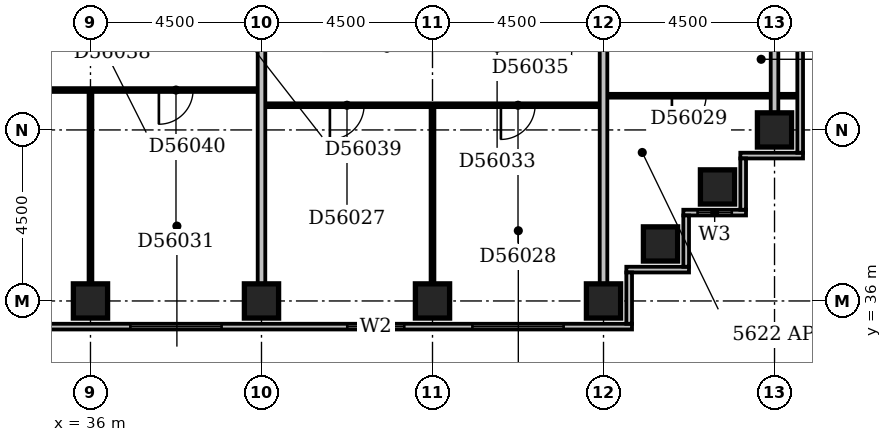
"""IFC4 building model, lengths in metres.
Left out: names, types, materials, properties, quantities, classifications, styles, units other than length and angle.
Written with IfcOpenShell. Run it as: python <this file> out.ifc"""

import sys

from ifc_helpers import new_model, si_unit, direction, frame, frame_2d, origin, origin_2d, place, context, subcontext, project, spatial, rectangle, extrude, element, fill, save


model = new_model("IFC4")
c1 = context("Model", 3, precision=1e-05, world=origin(), true_north=direction((0.0, 1.0)))
c2 = subcontext(c1, "Body", "Model", "MODEL_VIEW")
j1 = project(units=[si_unit("LENGTHUNIT", "METRE"), si_unit("PLANEANGLEUNIT", "RADIAN")], contexts=[c1])
p1 = place(None, origin())
s1 = spatial("IfcSite", under=j1, at=p1, CompositionType="ELEMENT")
p2 = place(p1, origin())
s2 = spatial("IfcBuilding", under=s1, at=p2, CompositionType="ELEMENT")
p3 = place(p2, frame((0.0, 0.0, 218.6)))
s3 = spatial("IfcBuildingStorey", under=s2, at=p3, CompositionType="ELEMENT", Elevation=218.6)
for number, where, z_axis, x_axis in (
    (1, (36.0, 36.0, -0.3), (0.0, 0.0, 1.0), (1.0, 0.0, 0.0)),
    (2, (40.5, 36.0, -0.3), (0.0, 0.0, 1.0), (1.0, 0.0, 0.0)),
    (3, (45.0, 36.0, -0.3), (0.0, 0.0, 1.0), (1.0, 0.0, 0.0)),
    (4, (49.5, 36.0, -0.3), (0.0, 0.0, 1.0), (1.0, 0.0, 0.0)),
    (5, (51.0, 37.5, -0.3), (0.0, 0.0, 1.0), (1.0, 0.0, 0.0)),
    (6, (52.5, 39.0, -0.3), (0.0, 0.0, 1.0), (1.0, 0.0, 0.0)),
    (7, (54.0, 40.5, -0.3), (0.0, 0.0, 1.0), (1.0, 0.0, 0.0)),
):
    element("IfcColumn", number, at=place(p3, frame(where, z_axis=z_axis, x_axis=x_axis)), inside=s3, PredefinedType="COLUMN", context=c2, shape_type="SweptSolid", body=[
        extrude(rectangle(XDim=0.9, YDim=0.9, at=origin_2d()), origin(), (0.0, 0.0, 1.0), 3.6),
    ])
p4 = place(p3, frame((23.1, 35.325, 0.0), z_axis=(0.0, 0.0, 1.0), x_axis=(1.0, 0.0, 0.0)))
e8 = element("IfcWall", 8, at=p4, inside=s3, PredefinedType="STANDARD", context=c2, shape_type="SweptSolid", body=[
    extrude(rectangle(XDim=27.15, YDim=0.15, at=frame_2d((13.575, 0.0))), origin(), (0.0, 0.0, 1.0), 2.7),
])
p5 = place(p4, frame((0.45, 0.0, 0.6)))
e9 = element("IfcOpeningElement", 9, at=p5, cuts=e8, PredefinedType="OPENING", context=c2, shape_type="SweptSolid", body=[
    extrude(rectangle(XDim=2.4, YDim=1.8, at=frame_2d((1.2, 0.9))), frame((0.0, 0.087, 0.0), z_axis=(0.0, -1.0, 0.0), x_axis=(1.0, 0.0, 0.0)), (0.0, 0.0, 1.0), 0.174),
])
p6 = place(p4, frame((4.571, 0.0, 0.6)))
e10 = element("IfcOpeningElement", 10, at=p6, cuts=e8, PredefinedType="OPENING", context=c2, shape_type="SweptSolid", body=[
    extrude(rectangle(XDim=2.1, YDim=1.8, at=frame_2d((1.05, 0.9))), frame((0.0, 0.087, 0.0), z_axis=(0.0, -1.0, 0.0), x_axis=(1.0, 0.0, 0.0)), (0.0, 0.0, 1.0), 0.174),
])
p7 = place(p4, frame((9.45, 0.0, 0.6)))
e11 = element("IfcOpeningElement", 11, at=p7, cuts=e8, PredefinedType="OPENING", context=c2, shape_type="SweptSolid", body=[
    extrude(rectangle(XDim=2.4, YDim=1.8, at=frame_2d((1.2, 0.9))), frame((0.0, 0.087, 0.0), z_axis=(0.0, -1.0, 0.0), x_axis=(1.0, 0.0, 0.0)), (0.0, 0.0, 1.0), 0.174),
])
p8 = place(p4, frame((13.95, 0.0, 0.6)))
e12 = element("IfcOpeningElement", 12, at=p8, cuts=e8, PredefinedType="OPENING", context=c2, shape_type="SweptSolid", body=[
    extrude(rectangle(XDim=2.4, YDim=1.8, at=frame_2d((1.2, 0.9))), frame((0.0, 0.087, 0.0), z_axis=(0.0, -1.0, 0.0), x_axis=(1.0, 0.0, 0.0)), (0.0, 0.0, 1.0), 0.174),
])
p9 = place(p4, frame((19.657, 0.0, 0.6)))
e13 = element("IfcOpeningElement", 13, at=p9, cuts=e8, PredefinedType="OPENING", context=c2, shape_type="SweptSolid", body=[
    extrude(rectangle(XDim=1.5, YDim=1.8, at=frame_2d((0.75, 0.9))), frame((0.0, 0.087, 0.0), z_axis=(0.0, -1.0, 0.0), x_axis=(1.0, 0.0, 0.0)), (0.0, 0.0, 1.0), 0.174),
])
p10 = place(p4, frame((22.95, 0.0, 0.6)))
e14 = element("IfcOpeningElement", 14, at=p10, cuts=e8, PredefinedType="OPENING", context=c2, shape_type="SweptSolid", body=[
    extrude(rectangle(XDim=2.4, YDim=1.8, at=frame_2d((1.2, 0.9))), frame((0.0, 0.087, 0.0), z_axis=(0.0, -1.0, 0.0), x_axis=(1.0, 0.0, 0.0)), (0.0, 0.0, 1.0), 0.174),
])
p11 = place(p3, frame((50.175, 35.4, 0.0), z_axis=(0.0, 0.0, 1.0), x_axis=(0.0, 1.0, 0.0)))
e15 = element("IfcWall", 15, at=p11, inside=s3, PredefinedType="STANDARD", context=c2, shape_type="SweptSolid", body=[
    extrude(rectangle(XDim=1.35, YDim=0.15, at=frame_2d((0.675, 0.0))), origin(), (0.0, 0.0, 1.0), 2.7),
])
p12 = place(p3, frame((50.1, 36.825, 0.0), z_axis=(0.0, 0.0, 1.0), x_axis=(1.0, 0.0, 0.0)))
e16 = element("IfcWall", 16, at=p12, inside=s3, PredefinedType="STANDARD", context=c2, shape_type="SweptSolid", body=[
    extrude(rectangle(XDim=1.65, YDim=0.15, at=frame_2d((0.825, 0.0))), origin(), (0.0, 0.0, 1.0), 2.7),
])
p13 = place(p3, frame((51.675, 36.9, 0.0), z_axis=(0.0, 0.0, 1.0), x_axis=(0.0, 1.0, 0.0)))
e17 = element("IfcWall", 17, at=p13, inside=s3, PredefinedType="STANDARD", context=c2, shape_type="SweptSolid", body=[
    extrude(rectangle(XDim=1.35, YDim=0.15, at=frame_2d((0.675, 0.0))), origin(), (0.0, 0.0, 1.0), 2.7),
])
p14 = place(p3, frame((51.6, 38.325, 0.0), z_axis=(0.0, 0.0, 1.0), x_axis=(1.0, 0.0, 0.0)))
e18 = element("IfcWall", 18, at=p14, inside=s3, PredefinedType="STANDARD", context=c2, shape_type="SweptSolid", body=[
    extrude(rectangle(XDim=1.65, YDim=0.15, at=frame_2d((0.825, 0.0))), origin(), (0.0, 0.0, 1.0), 2.7),
])
p15 = place(p14, frame((0.375, 0.0, 0.6)))
e19 = element("IfcOpeningElement", 19, at=p15, cuts=e18, PredefinedType="OPENING", context=c2, shape_type="SweptSolid", body=[
    extrude(rectangle(XDim=0.9, YDim=1.8, at=frame_2d((0.45, 0.9))), frame((0.0, 0.087, 0.0), z_axis=(0.0, -1.0, 0.0), x_axis=(1.0, 0.0, 0.0)), (0.0, 0.0, 1.0), 0.174),
])
p16 = place(p3, frame((53.175, 38.4, 0.0), z_axis=(0.0, 0.0, 1.0), x_axis=(0.0, 1.0, 0.0)))
e20 = element("IfcWall", 20, at=p16, inside=s3, PredefinedType="STANDARD", context=c2, shape_type="SweptSolid", body=[
    extrude(rectangle(XDim=1.35, YDim=0.15, at=frame_2d((0.675, 0.0))), origin(), (0.0, 0.0, 1.0), 2.7),
])
p17 = place(p3, frame((53.1, 39.825, 0.0), z_axis=(0.0, 0.0, 1.0), x_axis=(1.0, 0.0, 0.0)))
e21 = element("IfcWall", 21, at=p17, inside=s3, PredefinedType="STANDARD", context=c2, shape_type="SweptSolid", body=[
    extrude(rectangle(XDim=1.65, YDim=0.15, at=frame_2d((0.825, 0.0))), origin(), (0.0, 0.0, 1.0), 2.7),
])
p18 = place(p3, frame((54.675, 39.9, 0.0), z_axis=(0.0, 0.0, 1.0), x_axis=(0.0, 1.0, 0.0)))
e22 = element("IfcWall", 22, at=p18, inside=s3, PredefinedType="STANDARD", context=c2, shape_type="SweptSolid", body=[
    extrude(rectangle(XDim=14.85, YDim=0.15, at=frame_2d((7.425, 0.0))), origin(), (0.0, 0.0, 1.0), 2.7),
])
p19 = place(p3, frame((36.0, 36.45, 0.0), z_axis=(0.0, 0.0, 1.0), x_axis=(0.0, 1.0, 0.0)))
e23 = element("IfcWall", 23, at=p19, inside=s3, PredefinedType="PARTITIONING", context=c2, shape_type="SweptSolid", body=[
    extrude(rectangle(XDim=5.05, YDim=0.1, at=frame_2d((2.525, 0.0))), origin(), (0.0, 0.0, 1.0), 2.4),
])
p20 = place(p3, frame((40.5, 36.45, 0.0), z_axis=(0.0, 0.0, 1.0), x_axis=(0.0, 1.0, 0.0)))
e24 = element("IfcWall", 24, at=p20, inside=s3, PredefinedType="PARTITIONING", context=c2, shape_type="SweptSolid", body=[
    extrude(rectangle(XDim=12.95, YDim=0.2, at=frame_2d((6.475, 0.0))), origin(), (0.0, 0.0, 1.0), 3.3),
])
p21 = place(p3, frame((45.0, 36.45, 0.0), z_axis=(0.0, 0.0, 1.0), x_axis=(0.0, 1.0, 0.0)))
e25 = element("IfcWall", 25, at=p21, inside=s3, PredefinedType="PARTITIONING", context=c2, shape_type="SweptSolid", body=[
    extrude(rectangle(XDim=4.65, YDim=0.1, at=frame_2d((2.325, 0.0))), origin(), (0.0, 0.0, 1.0), 2.6),
])
p22 = place(p3, frame((49.5, 36.45, 0.0), z_axis=(0.0, 0.0, 1.0), x_axis=(0.0, 1.0, 0.0)))
e26 = element("IfcWall", 26, at=p22, inside=s3, PredefinedType="PARTITIONING", context=c2, shape_type="SweptSolid", body=[
    extrude(rectangle(XDim=12.95, YDim=0.2, at=frame_2d((6.475, 0.0))), origin(), (0.0, 0.0, 1.0), 3.3),
])
p23 = place(p3, frame((54.0, 40.95, 0.0), z_axis=(0.0, 0.0, 1.0), x_axis=(0.0, 1.0, 0.0)))
e27 = element("IfcWall", 27, at=p23, inside=s3, PredefinedType="PARTITIONING", context=c2, shape_type="SweptSolid", body=[
    extrude(rectangle(XDim=8.1, YDim=0.2, at=frame_2d((4.05, 0.0))), origin(), (0.0, 0.0, 1.0), 2.7),
])
p24 = place(p3, frame((40.6, 41.15, 0.0), z_axis=(0.0, 0.0, 1.0), x_axis=(1.0, 0.0, 0.0)))
e28 = element("IfcWall", 28, at=p24, inside=s3, PredefinedType="PARTITIONING", context=c2, shape_type="SweptSolid", body=[
    extrude(rectangle(XDim=8.8, YDim=0.1, at=frame_2d((4.4, 0.0))), origin(), (0.0, 0.0, 1.0), 3.3),
])
p25 = place(p24, frame((1.7, 0.0, 0.0)))
e29 = element("IfcOpeningElement", 29, at=p25, cuts=e28, PredefinedType="OPENING", context=c2, shape_type="SweptSolid", body=[
    extrude(rectangle(XDim=0.9, YDim=2.1, at=frame_2d((0.45, 1.05))), frame((0.0, 0.062, 0.0), z_axis=(0.0, -1.0, 0.0), x_axis=(1.0, 0.0, 0.0)), (0.0, 0.0, 1.0), 0.124),
])
p26 = place(p24, frame((6.2, 0.0, 0.0)))
e30 = element("IfcOpeningElement", 30, at=p26, cuts=e28, PredefinedType="OPENING", context=c2, shape_type="SweptSolid", body=[
    extrude(rectangle(XDim=0.9, YDim=2.1, at=frame_2d((0.45, 1.05))), frame((0.0, 0.062, 0.0), z_axis=(0.0, -1.0, 0.0), x_axis=(1.0, 0.0, 0.0)), (0.0, 0.0, 1.0), 0.124),
])
p27 = place(p3, frame((49.6, 41.4, 0.0), z_axis=(0.0, 0.0, 1.0), x_axis=(1.0, 0.0, 0.0)))
e31 = element("IfcWall", 31, at=p27, inside=s3, PredefinedType="PARTITIONING", context=c2, shape_type="SweptSolid", body=[
    extrude(rectangle(XDim=5.0, YDim=0.1, at=frame_2d((2.5, 0.0))), origin(), (0.0, 0.0, 1.0), 3.3),
])
p28 = place(p27, frame((1.7, 0.0, 0.0)))
e32 = element("IfcOpeningElement", 32, at=p28, cuts=e31, PredefinedType="OPENING", context=c2, shape_type="SweptSolid", body=[
    extrude(rectangle(XDim=0.9, YDim=2.1, at=frame_2d((0.45, 1.05))), frame((0.0, 0.062, 0.0), z_axis=(0.0, -1.0, 0.0), x_axis=(1.0, 0.0, 0.0)), (0.0, 0.0, 1.0), 0.124),
])
p29 = place(p3, frame((27.1, 41.55, 0.0), z_axis=(0.0, 0.0, 1.0), x_axis=(1.0, 0.0, 0.0)))
e33 = element("IfcWall", 33, at=p29, inside=s3, PredefinedType="PARTITIONING", context=c2, shape_type="SweptSolid", body=[
    extrude(rectangle(XDim=13.3, YDim=0.1, at=frame_2d((6.65, 0.0))), origin(), (0.0, 0.0, 1.0), 3.3),
])
p30 = place(p29, frame((3.9, 0.0, 0.0)))
e34 = element("IfcOpeningElement", 34, at=p30, cuts=e33, PredefinedType="OPENING", context=c2, shape_type="SweptSolid", body=[
    extrude(rectangle(XDim=0.9, YDim=2.1, at=frame_2d((0.45, 1.05))), frame((0.0, 0.062, 0.0), z_axis=(0.0, -1.0, 0.0), x_axis=(1.0, 0.0, 0.0)), (0.0, 0.0, 1.0), 0.124),
])
p31 = place(p29, frame((10.7, 0.0, 0.0)))
e35 = element("IfcOpeningElement", 35, at=p31, cuts=e33, PredefinedType="OPENING", context=c2, shape_type="SweptSolid", body=[
    extrude(rectangle(XDim=0.9, YDim=2.1, at=frame_2d((0.45, 1.05))), frame((0.0, 0.062, 0.0), z_axis=(0.0, -1.0, 0.0), x_axis=(1.0, 0.0, 0.0)), (0.0, 0.0, 1.0), 0.124),
])
p32 = place(p8, origin())
e36 = element("IfcWindow", 36, at=p32, inside=s3, PartitioningType="SINGLE_PANEL", PredefinedType="WINDOW", context=c2, shape_type="SweptSolid", body=[
    extrude(rectangle(XDim=2.4, YDim=1.8, at=frame_2d((1.2, 0.9))), frame((0.0, 0.03, 0.0), z_axis=(0.0, -1.0, 0.0), x_axis=(1.0, 0.0, 0.0)), (0.0, 0.0, 1.0), 0.06),
])
fill(e12, e36)
p33 = place(p9, origin())
e37 = element("IfcWindow", 37, at=p33, inside=s3, PartitioningType="SINGLE_PANEL", PredefinedType="WINDOW", context=c2, shape_type="SweptSolid", body=[
    extrude(rectangle(XDim=1.5, YDim=1.8, at=frame_2d((0.75, 0.9))), frame((0.0, 0.03, 0.0), z_axis=(0.0, -1.0, 0.0), x_axis=(1.0, 0.0, 0.0)), (0.0, 0.0, 1.0), 0.06),
])
fill(e13, e37)
p34 = place(p10, origin())
e38 = element("IfcWindow", 38, at=p34, inside=s3, PartitioningType="SINGLE_PANEL", PredefinedType="WINDOW", context=c2, shape_type="SweptSolid", body=[
    extrude(rectangle(XDim=2.4, YDim=1.8, at=frame_2d((1.2, 0.9))), frame((0.0, 0.03, 0.0), z_axis=(0.0, -1.0, 0.0), x_axis=(1.0, 0.0, 0.0)), (0.0, 0.0, 1.0), 0.06),
])
fill(e14, e38)
p35 = place(p15, origin())
e39 = element("IfcWindow", 39, at=p35, inside=s3, PartitioningType="SINGLE_PANEL", PredefinedType="WINDOW", context=c2, shape_type="SweptSolid", body=[
    extrude(rectangle(XDim=0.9, YDim=1.8, at=frame_2d((0.45, 0.9))), frame((0.0, 0.03, 0.0), z_axis=(0.0, -1.0, 0.0), x_axis=(1.0, 0.0, 0.0)), (0.0, 0.0, 1.0), 0.06),
])
fill(e19, e39)
p36 = place(p25, frame((0.9, 0.0, 0.0), z_axis=(0.0, 0.0, 1.0), x_axis=(-1.0, 0.0, 0.0)))
e40 = element("IfcDoor", 40, at=p36, inside=s3, OperationType="SINGLE_SWING_RIGHT", PredefinedType="DOOR", context=c2, shape_type="SweptSolid", body=[
    extrude(rectangle(XDim=0.9, YDim=2.1, at=frame_2d((0.45, 1.05))), frame((0.0, 0.025, 0.0), z_axis=(0.0, -1.0, 0.0), x_axis=(1.0, 0.0, 0.0)), (0.0, 0.0, 1.0), 0.05),
])
fill(e29, e40)
p37 = place(p26, frame((0.9, 0.0, 0.0), z_axis=(0.0, 0.0, 1.0), x_axis=(-1.0, 0.0, 0.0)))
e41 = element("IfcDoor", 41, at=p37, inside=s3, OperationType="SINGLE_SWING_RIGHT", PredefinedType="DOOR", context=c2, shape_type="SweptSolid", body=[
    extrude(rectangle(XDim=0.9, YDim=2.1, at=frame_2d((0.45, 1.05))), frame((0.0, 0.025, 0.0), z_axis=(0.0, -1.0, 0.0), x_axis=(1.0, 0.0, 0.0)), (0.0, 0.0, 1.0), 0.05),
])
fill(e30, e41)
p38 = place(p28, frame((0.9, 0.0, 0.0), z_axis=(0.0, 0.0, 1.0), x_axis=(-1.0, 0.0, 0.0)))
e42 = element("IfcDoor", 42, at=p38, inside=s3, OperationType="SINGLE_SWING_RIGHT", PredefinedType="DOOR", context=c2, shape_type="SweptSolid", body=[
    extrude(rectangle(XDim=0.9, YDim=2.1, at=frame_2d((0.45, 1.05))), frame((0.0, 0.025, 0.0), z_axis=(0.0, -1.0, 0.0), x_axis=(1.0, 0.0, 0.0)), (0.0, 0.0, 1.0), 0.05),
])
fill(e32, e42)
p39 = place(p31, frame((0.9, 0.0, 0.0), z_axis=(0.0, 0.0, 1.0), x_axis=(-1.0, 0.0, 0.0)))
e43 = element("IfcDoor", 43, at=p39, inside=s3, OperationType="SINGLE_SWING_RIGHT", PredefinedType="DOOR", context=c2, shape_type="SweptSolid", body=[
    extrude(rectangle(XDim=0.9, YDim=2.1, at=frame_2d((0.45, 1.05))), frame((0.0, 0.025, 0.0), z_axis=(0.0, -1.0, 0.0), x_axis=(1.0, 0.0, 0.0)), (0.0, 0.0, 1.0), 0.05),
])
fill(e35, e43)
save(model, sys.argv[1])
